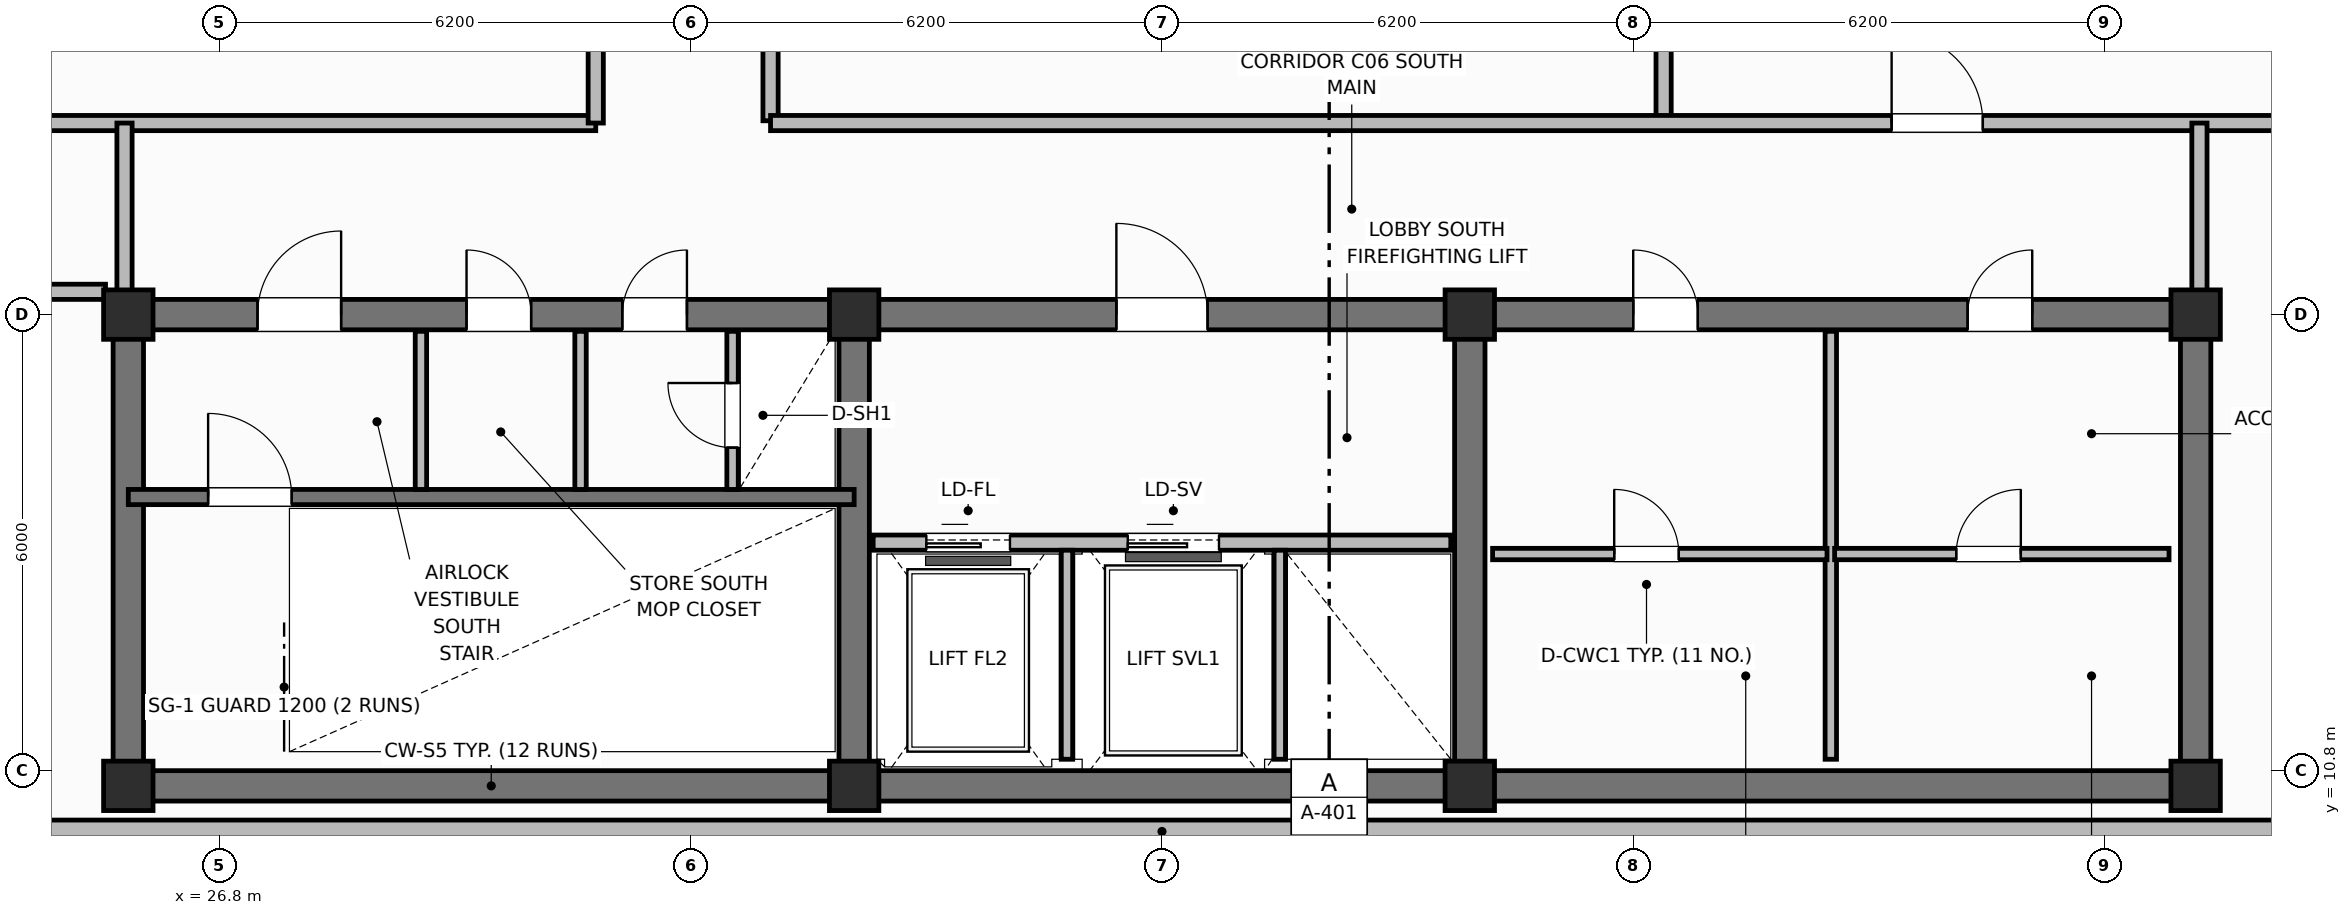
"""IFC4 building model, lengths in metres.
Left out: names, types, materials, properties, quantities, classifications, styles, units other than length and angle.
Written with IfcOpenShell. Run it as: python <this file> out.ifc"""

import sys

from ifc_helpers import new_model, si_unit, direction, frame, frame_2d, origin, origin_2d, place, context, subcontext, project, spatial, rectangle, extrude, element, fill, save


model = new_model("IFC4")
c1 = context("Model", 3, precision=1e-05, world=origin(), true_north=direction((0.0, 1.0)))
c2 = subcontext(c1, "Body", "Model", "MODEL_VIEW")
j1 = project(units=[si_unit("LENGTHUNIT", "METRE"), si_unit("PLANEANGLEUNIT", "RADIAN")], contexts=[c1])
p1 = place(None, origin())
s1 = spatial("IfcSite", under=j1, at=p1, CompositionType="ELEMENT")
p2 = place(p1, origin())
s2 = spatial("IfcBuilding", under=s1, at=p2, CompositionType="ELEMENT")
p3 = place(p2, frame((0.0, 0.0, 320.0)))
s3 = spatial("IfcBuildingStorey", under=s2, at=p3, CompositionType="ELEMENT", Elevation=320.0)
p4 = place(p3, frame((52.8, 10.6, 0.0), z_axis=(0.0, 0.0, 1.0), x_axis=(-1.0, 0.0, 0.0)))
e1 = element("IfcWall", 1, at=p4, inside=s3, PredefinedType="SHEAR", context=c2, shape_type="SweptSolid", body=[
    extrude(rectangle(XDim=27.2, YDim=0.4, at=frame_2d((13.6, 0.0))), origin(), (0.0, 0.0, 1.0), 3.6),
])
for number, where, z_axis, x_axis in (
    (2, (25.6, 10.8, 0.0), (0.0, 0.0, 1.0), (0.0, 1.0, 0.0)),
    (3, (52.8, 10.8, 0.0), (0.0, 0.0, 1.0), (0.0, 1.0, 0.0)),
):
    element("IfcWall", number, at=place(p3, frame(where, z_axis=z_axis, x_axis=x_axis)), inside=s3, PredefinedType="SHEAR", context=c2, shape_type="SweptSolid", body=[
        extrude(rectangle(XDim=5.8, YDim=0.4, at=frame_2d((2.9, 0.0))), origin(), (0.0, 0.0, 1.0), 3.6),
    ])
p5 = place(p3, frame((25.6, 16.8, 0.0), z_axis=(0.0, 0.0, 1.0), x_axis=(1.0, 0.0, 0.0)))
e4 = element("IfcWall", 4, at=p5, inside=s3, PredefinedType="SHEAR", context=c2, shape_type="SweptSolid", body=[
    extrude(rectangle(XDim=27.2, YDim=0.4, at=frame_2d((13.6, 0.0))), origin(), (0.0, 0.0, 1.0), 3.6),
])
p6 = place(p5, frame((1.7, 0.0, 0.0)))
e5 = element("IfcOpeningElement", 5, at=p6, cuts=e4, PredefinedType="OPENING", context=c2, shape_type="SweptSolid", body=[
    extrude(rectangle(XDim=1.1, YDim=2.15, at=frame_2d((0.55, 1.075))), frame((0.0, 0.21, 0.0), z_axis=(0.0, -1.0, 0.0), x_axis=(1.0, 0.0, 0.0)), (0.0, 0.0, 1.0), 0.42),
])
p7 = place(p5, frame((4.45, 0.0, 0.0)))
e6 = element("IfcOpeningElement", 6, at=p7, cuts=e4, PredefinedType="OPENING", context=c2, shape_type="SweptSolid", body=[
    extrude(rectangle(XDim=0.85, YDim=2.1, at=frame_2d((0.425, 1.05))), frame((0.0, 0.21, 0.0), z_axis=(0.0, -1.0, 0.0), x_axis=(1.0, 0.0, 0.0)), (0.0, 0.0, 1.0), 0.42),
])
p8 = place(p5, frame((6.5, 0.0, 0.0)))
e7 = element("IfcOpeningElement", 7, at=p8, cuts=e4, PredefinedType="OPENING", context=c2, shape_type="SweptSolid", body=[
    extrude(rectangle(XDim=0.85, YDim=2.1, at=frame_2d((0.425, 1.05))), frame((0.0, 0.21, 0.0), z_axis=(0.0, -1.0, 0.0), x_axis=(1.0, 0.0, 0.0)), (0.0, 0.0, 1.0), 0.42),
])
p9 = place(p5, frame((13.0, 0.0, 0.0)))
e8 = element("IfcOpeningElement", 8, at=p9, cuts=e4, PredefinedType="OPENING", context=c2, shape_type="SweptSolid", body=[
    extrude(rectangle(XDim=1.2, YDim=2.15, at=frame_2d((0.6, 1.075))), frame((0.0, 0.21, 0.0), z_axis=(0.0, -1.0, 0.0), x_axis=(1.0, 0.0, 0.0)), (0.0, 0.0, 1.0), 0.42),
])
p10 = place(p5, frame((19.8, 0.0, 0.0)))
e9 = element("IfcOpeningElement", 9, at=p10, cuts=e4, PredefinedType="OPENING", context=c2, shape_type="SweptSolid", body=[
    extrude(rectangle(XDim=0.85, YDim=2.1, at=frame_2d((0.425, 1.05))), frame((0.0, 0.21, 0.0), z_axis=(0.0, -1.0, 0.0), x_axis=(1.0, 0.0, 0.0)), (0.0, 0.0, 1.0), 0.42),
])
p11 = place(p5, frame((24.2, 0.0, 0.0)))
e10 = element("IfcOpeningElement", 10, at=p11, cuts=e4, PredefinedType="OPENING", context=c2, shape_type="SweptSolid", body=[
    extrude(rectangle(XDim=0.85, YDim=2.1, at=frame_2d((0.425, 1.05))), frame((0.0, 0.21, 0.0), z_axis=(0.0, -1.0, 0.0), x_axis=(1.0, 0.0, 0.0)), (0.0, 0.0, 1.0), 0.42),
])
for number, where, z_axis, x_axis in (
    (11, (35.15, 10.8, 0.0), (0.0, 0.0, 1.0), (0.0, 1.0, 0.0)),
    (12, (43.25, 10.8, 0.0), (0.0, 0.0, 1.0), (0.0, 1.0, 0.0)),
):
    element("IfcWall", number, at=place(p3, frame(where, z_axis=z_axis, x_axis=x_axis)), inside=s3, PredefinedType="SHEAR", context=c2, shape_type="SweptSolid", body=[
        extrude(rectangle(XDim=5.8, YDim=0.4, at=frame_2d((2.9, 0.0))), origin(), (0.0, 0.0, 1.0), 3.6),
    ])
for number, where, z_axis, x_axis in (
    (13, (25.6, 10.6, 0.0), (0.0, 0.0, 1.0), (1.0, 0.0, 0.0)),
    (14, (25.6, 16.8, 0.0), (0.0, 0.0, 1.0), (1.0, 0.0, 0.0)),
    (15, (35.15, 10.6, 0.0), (0.0, 0.0, 1.0), (1.0, 0.0, 0.0)),
    (16, (35.15, 16.8, 0.0), (0.0, 0.0, 1.0), (1.0, 0.0, 0.0)),
    (17, (43.25, 10.6, 0.0), (0.0, 0.0, 1.0), (1.0, 0.0, 0.0)),
    (18, (43.25, 16.8, 0.0), (0.0, 0.0, 1.0), (1.0, 0.0, 0.0)),
    (19, (52.8, 10.6, 0.0), (0.0, 0.0, 1.0), (1.0, 0.0, 0.0)),
    (20, (52.8, 16.8, 0.0), (0.0, 0.0, 1.0), (1.0, 0.0, 0.0)),
):
    element("IfcColumn", number, at=place(p3, frame(where, z_axis=z_axis, x_axis=x_axis)), inside=s3, PredefinedType="COLUMN", context=c2, shape_type="SweptSolid", body=[
        extrude(rectangle(XDim=0.65, YDim=0.65, at=origin_2d()), origin(), (0.0, 0.0, 1.0), 3.6),
    ])
p12 = place(p3, frame((23.76, 10.0, 0.0), z_axis=(0.0, 0.0, 1.0), x_axis=(1.0, 0.0, 0.0)))
e21 = element("IfcWall", 21, at=p12, inside=s3, PredefinedType="SOLIDWALL", context=c2, shape_type="SweptSolid", body=[
    extrude(rectangle(XDim=30.88, YDim=0.3, at=frame_2d((15.44, 0.0))), origin(), (0.0, 0.0, 1.0), 2.83),
])
p13 = place(p3, frame((25.6, 14.4, 0.0), z_axis=(0.0, 0.0, 1.0), x_axis=(1.0, 0.0, 0.0)))
e22 = element("IfcWall", 22, at=p13, inside=s3, PredefinedType="SHEAR", context=c2, shape_type="SweptSolid", body=[
    extrude(rectangle(XDim=9.55, YDim=0.2, at=frame_2d((4.775, 0.0))), origin(), (0.0, 0.0, 1.0), 3.6),
])
p14 = place(p13, frame((1.05, 0.0, 0.0)))
e23 = element("IfcOpeningElement", 23, at=p14, cuts=e22, PredefinedType="OPENING", context=c2, shape_type="SweptSolid", body=[
    extrude(rectangle(XDim=1.1, YDim=2.15, at=frame_2d((0.55, 1.075))), frame((0.0, 0.11, 0.0), z_axis=(0.0, -1.0, 0.0), x_axis=(1.0, 0.0, 0.0)), (0.0, 0.0, 1.0), 0.22),
])
for number, where, z_axis, x_axis in (
    (24, (29.45, 14.5, 0.0), (0.0, 0.0, 1.0), (0.0, 1.0, 0.0)),
    (25, (31.55, 14.5, 0.0), (0.0, 0.0, 1.0), (0.0, 1.0, 0.0)),
):
    element("IfcWall", number, at=place(p3, frame(where, z_axis=z_axis, x_axis=x_axis)), inside=s3, PredefinedType="PARTITIONING", context=c2, shape_type="SweptSolid", body=[
        extrude(rectangle(XDim=2.08, YDim=0.15, at=frame_2d((1.04, 0.0))), origin(), (0.0, 0.0, 1.0), 2.53),
    ])
p15 = place(p3, frame((33.55, 14.5, 0.0), z_axis=(0.0, 0.0, 1.0), x_axis=(0.0, 1.0, 0.0)))
e26 = element("IfcWall", 26, at=p15, inside=s3, PredefinedType="PARTITIONING", context=c2, shape_type="SweptSolid", body=[
    extrude(rectangle(XDim=2.08, YDim=0.15, at=frame_2d((1.04, 0.0))), origin(), (0.0, 0.0, 1.0), 2.53),
])
p16 = place(p15, frame((0.55, 0.0, 0.0)))
e27 = element("IfcOpeningElement", 27, at=p16, cuts=e26, PredefinedType="OPENING", context=c2, shape_type="SweptSolid", body=[
    extrude(rectangle(XDim=0.85, YDim=2.05, at=frame_2d((0.425, 1.025))), frame((0.0, 0.085, 0.0), z_axis=(0.0, -1.0, 0.0), x_axis=(1.0, 0.0, 0.0)), (0.0, 0.0, 1.0), 0.17),
])
p17 = place(p3, frame((35.4, 13.8, 0.0), z_axis=(0.0, 0.0, 1.0), x_axis=(1.0, 0.0, 0.0)))
e28 = element("IfcWall", 28, at=p17, inside=s3, PredefinedType="PARTITIONING", context=c2, shape_type="SweptSolid", body=[
    extrude(rectangle(XDim=7.6, YDim=0.2, at=frame_2d((3.8, 0.0))), origin(), (0.0, 0.0, 1.0), 2.19),
])
p18 = place(p17, frame((0.7, 0.0, 0.0)))
e29 = element("IfcOpeningElement", 29, at=p18, cuts=e28, PredefinedType="OPENING", context=c2, shape_type="SweptSolid", body=[
    extrude(rectangle(XDim=1.1, YDim=2.15, at=frame_2d((0.55, 1.075))), frame((0.0, 0.11, 0.0), z_axis=(0.0, -1.0, 0.0), x_axis=(1.0, 0.0, 0.0)), (0.0, 0.0, 1.0), 0.22),
])
p19 = place(p17, frame((3.35, 0.0, 0.0)))
e30 = element("IfcOpeningElement", 30, at=p19, cuts=e28, PredefinedType="OPENING", context=c2, shape_type="SweptSolid", body=[
    extrude(rectangle(XDim=1.2, YDim=2.15, at=frame_2d((0.6, 1.075))), frame((0.0, 0.11, 0.0), z_axis=(0.0, -1.0, 0.0), x_axis=(1.0, 0.0, 0.0)), (0.0, 0.0, 1.0), 0.22),
])
for number, where, z_axis, x_axis in (
    (31, (37.95, 10.95, 0.0), (0.0, 0.0, 1.0), (0.0, 1.0, 0.0)),
    (32, (40.75, 10.95, 0.0), (0.0, 0.0, 1.0), (0.0, 1.0, 0.0)),
):
    element("IfcWall", number, at=place(p3, frame(where, z_axis=z_axis, x_axis=x_axis)), inside=s3, PredefinedType="PARTITIONING", context=c2, shape_type="SweptSolid", body=[
        extrude(rectangle(XDim=2.75, YDim=0.15, at=frame_2d((1.375, 0.0))), origin(), (0.0, 0.0, 1.0), 2.53),
    ])
p20 = place(p3, frame((48.0, 10.95, 0.0), z_axis=(0.0, 0.0, 1.0), x_axis=(0.0, 1.0, 0.0)))
e33 = element("IfcWall", 33, at=p20, inside=s3, PredefinedType="PARTITIONING", context=c2, shape_type="SweptSolid", body=[
    extrude(rectangle(XDim=5.63, YDim=0.15, at=frame_2d((2.815, 0.0))), origin(), (0.0, 0.0, 1.0), 2.53),
])
p21 = place(p3, frame((43.55, 13.65, 0.0), z_axis=(0.0, 0.0, 1.0), x_axis=(1.0, 0.0, 0.0)))
e34 = element("IfcWall", 34, at=p21, inside=s3, PredefinedType="PARTITIONING", context=c2, shape_type="SweptSolid", body=[
    extrude(rectangle(XDim=4.4, YDim=0.15, at=frame_2d((2.2, 0.0))), origin(), (0.0, 0.0, 1.0), 2.53),
])
p22 = place(p21, frame((1.6, 0.0, 0.0)))
e35 = element("IfcOpeningElement", 35, at=p22, cuts=e34, PredefinedType="OPENING", context=c2, shape_type="SweptSolid", body=[
    extrude(rectangle(XDim=0.85, YDim=2.1, at=frame_2d((0.425, 1.05))), frame((0.0, 0.085, 0.0), z_axis=(0.0, -1.0, 0.0), x_axis=(1.0, 0.0, 0.0)), (0.0, 0.0, 1.0), 0.17),
])
p23 = place(p3, frame((48.05, 13.65, 0.0), z_axis=(0.0, 0.0, 1.0), x_axis=(1.0, 0.0, 0.0)))
e36 = element("IfcWall", 36, at=p23, inside=s3, PredefinedType="PARTITIONING", context=c2, shape_type="SweptSolid", body=[
    extrude(rectangle(XDim=4.4, YDim=0.15, at=frame_2d((2.2, 0.0))), origin(), (0.0, 0.0, 1.0), 2.53),
])
p24 = place(p23, frame((1.6, 0.0, 0.0)))
e37 = element("IfcOpeningElement", 37, at=p24, cuts=e36, PredefinedType="OPENING", context=c2, shape_type="SweptSolid", body=[
    extrude(rectangle(XDim=0.85, YDim=2.1, at=frame_2d((0.425, 1.05))), frame((0.0, 0.085, 0.0), z_axis=(0.0, -1.0, 0.0), x_axis=(1.0, 0.0, 0.0)), (0.0, 0.0, 1.0), 0.17),
])
p25 = place(p3, frame((21.53, 19.32, 0.0), z_axis=(0.0, 0.0, 1.0), x_axis=(1.0, 0.0, 0.0)))
e38 = element("IfcWall", 38, at=p25, inside=s3, PredefinedType="PARTITIONING", context=c2, shape_type="SweptSolid", body=[
    extrude(rectangle(XDim=10.22, YDim=0.2, at=frame_2d((5.11, 0.0))), origin(), (0.0, 0.0, 1.0), 2.53),
])
p26 = place(p3, frame((31.75, 19.32, 0.0), z_axis=(0.0, 0.0, 1.0), x_axis=(0.0, 1.0, 0.0)))
e39 = element("IfcWall", 39, at=p26, inside=s3, PredefinedType="PARTITIONING", context=c2, shape_type="SweptSolid", body=[
    extrude(rectangle(XDim=17.76, YDim=0.2, at=frame_2d((8.88, 0.0))), origin(), (0.0, 0.0, 1.0), 2.53),
])
p27 = place(p26, frame((6.0, 0.0, 0.0)))
e40 = element("IfcOpeningElement", 40, at=p27, cuts=e39, PredefinedType="OPENING", context=c2, shape_type="SweptSolid", body=[
    extrude(rectangle(XDim=1.2, YDim=2.15, at=frame_2d((0.6, 1.075))), frame((0.0, 0.11, 0.0), z_axis=(0.0, -1.0, 0.0), x_axis=(1.0, 0.0, 0.0)), (0.0, 0.0, 1.0), 0.22),
])
p28 = place(p3, frame((34.05, 19.35, 0.0), z_axis=(0.0, 0.0, 1.0), x_axis=(0.0, 1.0, 0.0)))
e41 = element("IfcWall", 41, at=p28, inside=s3, PredefinedType="PARTITIONING", context=c2, shape_type="SweptSolid", body=[
    extrude(rectangle(XDim=17.7, YDim=0.2, at=frame_2d((8.85, 0.0))), origin(), (0.0, 0.0, 1.0), 2.53),
])
p29 = place(p28, frame((6.0, 0.0, 0.0)))
e42 = element("IfcOpeningElement", 42, at=p29, cuts=e41, PredefinedType="OPENING", context=c2, shape_type="SweptSolid", body=[
    extrude(rectangle(XDim=1.2, YDim=2.15, at=frame_2d((0.6, 1.075))), frame((0.0, 0.11, 0.0), z_axis=(0.0, -1.0, 0.0), x_axis=(1.0, 0.0, 0.0)), (0.0, 0.0, 1.0), 0.22),
])
p30 = place(p3, frame((45.8, 19.35, 0.0), z_axis=(0.0, 0.0, 1.0), x_axis=(0.0, 1.0, 0.0)))
e43 = element("IfcWall", 43, at=p30, inside=s3, PredefinedType="PARTITIONING", context=c2, shape_type="SweptSolid", body=[
    extrude(rectangle(XDim=17.7, YDim=0.2, at=frame_2d((8.85, 0.0))), origin(), (0.0, 0.0, 1.0), 2.53),
])
p31 = place(p3, frame((34.05, 19.32, 0.0), z_axis=(0.0, 0.0, 1.0), x_axis=(1.0, 0.0, 0.0)))
e44 = element("IfcWall", 44, at=p31, inside=s3, PredefinedType="PARTITIONING", context=c2, shape_type="SweptSolid", body=[
    extrude(rectangle(XDim=22.82, YDim=0.2, at=frame_2d((11.41, 0.0))), origin(), (0.0, 0.0, 1.0), 2.53),
])
p32 = place(p31, frame((14.75, 0.0, 0.0)))
e45 = element("IfcOpeningElement", 45, at=p32, cuts=e44, PredefinedType="OPENING", context=c2, shape_type="SweptSolid", body=[
    extrude(rectangle(XDim=1.2, YDim=2.15, at=frame_2d((0.6, 1.075))), frame((0.0, 0.11, 0.0), z_axis=(0.0, -1.0, 0.0), x_axis=(1.0, 0.0, 0.0)), (0.0, 0.0, 1.0), 0.22),
])
for number, where, z_axis, x_axis in (
    (46, (52.85, 16.95, 0.0), (0.0, 0.0, 1.0), (0.0, 1.0, 0.0)),
    (47, (25.55, 16.95, 0.0), (0.0, 0.0, 1.0), (0.0, 1.0, 0.0)),
):
    element("IfcWall", number, at=place(p3, frame(where, z_axis=z_axis, x_axis=x_axis)), inside=s3, PredefinedType="PARTITIONING", context=c2, shape_type="SweptSolid", body=[
        extrude(rectangle(XDim=2.37, YDim=0.2, at=frame_2d((1.185, 0.0))), origin(), (0.0, 0.0, 1.0), 2.53),
    ])
p33 = place(p3, frame((21.53, 17.1, 0.0), z_axis=(0.0, 0.0, 1.0), x_axis=(1.0, 0.0, 0.0)))
e48 = element("IfcWall", 48, at=p33, inside=s3, PredefinedType="PARTITIONING", context=c2, shape_type="SweptSolid", body=[
    extrude(rectangle(XDim=3.77, YDim=0.2, at=frame_2d((1.885, 0.0))), origin(), (0.0, 0.0, 1.0), 2.53),
])
p34 = place(p14, origin())
e49 = element("IfcDoor", 49, at=p34, inside=s3, OperationType="SINGLE_SWING_LEFT", PredefinedType="DOOR", context=c2, shape_type="SweptSolid", body=[
    extrude(rectangle(XDim=1.1, YDim=2.15, at=frame_2d((0.55, 1.075))), frame((0.0, 0.025, 0.0), z_axis=(0.0, -1.0, 0.0), x_axis=(1.0, 0.0, 0.0)), (0.0, 0.0, 1.0), 0.05),
])
fill(e23, e49)
p35 = place(p16, origin())
e50 = element("IfcDoor", 50, at=p35, inside=s3, OperationType="SINGLE_SWING_RIGHT", PredefinedType="TRAPDOOR", context=c2, shape_type="SweptSolid", body=[
    extrude(rectangle(XDim=0.85, YDim=2.05, at=frame_2d((0.425, 1.025))), frame((0.0, 0.025, 0.0), z_axis=(0.0, -1.0, 0.0), x_axis=(1.0, 0.0, 0.0)), (0.0, 0.0, 1.0), 0.05),
])
fill(e27, e50)
p36 = place(p18, origin())
e51 = element("IfcDoor", 51, at=p36, inside=s3, OperationType="SLIDING_TO_LEFT", PredefinedType="DOOR", context=c2, shape_type="SweptSolid", body=[
    extrude(rectangle(XDim=1.1, YDim=2.15, at=frame_2d((0.55, 1.075))), frame((0.0, 0.025, 0.0), z_axis=(0.0, -1.0, 0.0), x_axis=(1.0, 0.0, 0.0)), (0.0, 0.0, 1.0), 0.05),
])
fill(e29, e51)
p37 = place(p19, origin())
e52 = element("IfcDoor", 52, at=p37, inside=s3, OperationType="SLIDING_TO_LEFT", PredefinedType="DOOR", context=c2, shape_type="SweptSolid", body=[
    extrude(rectangle(XDim=1.2, YDim=2.15, at=frame_2d((0.6, 1.075))), frame((0.0, 0.025, 0.0), z_axis=(0.0, -1.0, 0.0), x_axis=(1.0, 0.0, 0.0)), (0.0, 0.0, 1.0), 0.05),
])
fill(e30, e52)
p38 = place(p22, origin())
e53 = element("IfcDoor", 53, at=p38, inside=s3, OperationType="SINGLE_SWING_LEFT", PredefinedType="DOOR", context=c2, shape_type="SweptSolid", body=[
    extrude(rectangle(XDim=0.85, YDim=2.1, at=frame_2d((0.425, 1.05))), frame((0.0, 0.025, 0.0), z_axis=(0.0, -1.0, 0.0), x_axis=(1.0, 0.0, 0.0)), (0.0, 0.0, 1.0), 0.05),
])
fill(e35, e53)
p39 = place(p24, origin())
e54 = element("IfcDoor", 54, at=p39, inside=s3, OperationType="SINGLE_SWING_RIGHT", PredefinedType="DOOR", context=c2, shape_type="SweptSolid", body=[
    extrude(rectangle(XDim=0.85, YDim=2.1, at=frame_2d((0.425, 1.05))), frame((0.0, 0.025, 0.0), z_axis=(0.0, -1.0, 0.0), x_axis=(1.0, 0.0, 0.0)), (0.0, 0.0, 1.0), 0.05),
])
fill(e37, e54)
p40 = place(p32, origin())
e55 = element("IfcDoor", 55, at=p40, inside=s3, OperationType="SINGLE_SWING_LEFT", PredefinedType="DOOR", context=c2, shape_type="SweptSolid", body=[
    extrude(rectangle(XDim=1.2, YDim=2.15, at=frame_2d((0.6, 1.075))), frame((0.0, 0.025, 0.0), z_axis=(0.0, -1.0, 0.0), x_axis=(1.0, 0.0, 0.0)), (0.0, 0.0, 1.0), 0.05),
])
fill(e45, e55)
p41 = place(p6, origin())
e56 = element("IfcDoor", 56, at=p41, inside=s3, OperationType="SINGLE_SWING_RIGHT", PredefinedType="DOOR", context=c2, shape_type="SweptSolid", body=[
    extrude(rectangle(XDim=1.1, YDim=2.15, at=frame_2d((0.55, 1.075))), frame((0.0, 0.025, 0.0), z_axis=(0.0, -1.0, 0.0), x_axis=(1.0, 0.0, 0.0)), (0.0, 0.0, 1.0), 0.05),
])
fill(e5, e56)
p42 = place(p7, origin())
e57 = element("IfcDoor", 57, at=p42, inside=s3, OperationType="SINGLE_SWING_LEFT", PredefinedType="DOOR", context=c2, shape_type="SweptSolid", body=[
    extrude(rectangle(XDim=0.85, YDim=2.1, at=frame_2d((0.425, 1.05))), frame((0.0, 0.025, 0.0), z_axis=(0.0, -1.0, 0.0), x_axis=(1.0, 0.0, 0.0)), (0.0, 0.0, 1.0), 0.05),
])
fill(e6, e57)
p43 = place(p8, origin())
e58 = element("IfcDoor", 58, at=p43, inside=s3, OperationType="SINGLE_SWING_RIGHT", PredefinedType="DOOR", context=c2, shape_type="SweptSolid", body=[
    extrude(rectangle(XDim=0.85, YDim=2.1, at=frame_2d((0.425, 1.05))), frame((0.0, 0.025, 0.0), z_axis=(0.0, -1.0, 0.0), x_axis=(1.0, 0.0, 0.0)), (0.0, 0.0, 1.0), 0.05),
])
fill(e7, e58)
p44 = place(p9, origin())
e59 = element("IfcDoor", 59, at=p44, inside=s3, OperationType="SINGLE_SWING_LEFT", PredefinedType="DOOR", context=c2, shape_type="SweptSolid", body=[
    extrude(rectangle(XDim=1.2, YDim=2.15, at=frame_2d((0.6, 1.075))), frame((0.0, 0.025, 0.0), z_axis=(0.0, -1.0, 0.0), x_axis=(1.0, 0.0, 0.0)), (0.0, 0.0, 1.0), 0.05),
])
fill(e8, e59)
p45 = place(p10, origin())
e60 = element("IfcDoor", 60, at=p45, inside=s3, OperationType="SINGLE_SWING_LEFT", PredefinedType="DOOR", context=c2, shape_type="SweptSolid", body=[
    extrude(rectangle(XDim=0.85, YDim=2.1, at=frame_2d((0.425, 1.05))), frame((0.0, 0.025, 0.0), z_axis=(0.0, -1.0, 0.0), x_axis=(1.0, 0.0, 0.0)), (0.0, 0.0, 1.0), 0.05),
])
fill(e9, e60)
p46 = place(p11, origin())
e61 = element("IfcDoor", 61, at=p46, inside=s3, OperationType="SINGLE_SWING_RIGHT", PredefinedType="DOOR", context=c2, shape_type="SweptSolid", body=[
    extrude(rectangle(XDim=0.85, YDim=2.1, at=frame_2d((0.425, 1.05))), frame((0.0, 0.025, 0.0), z_axis=(0.0, -1.0, 0.0), x_axis=(1.0, 0.0, 0.0)), (0.0, 0.0, 1.0), 0.05),
])
fill(e10, e61)
save(model, sys.argv[1])
